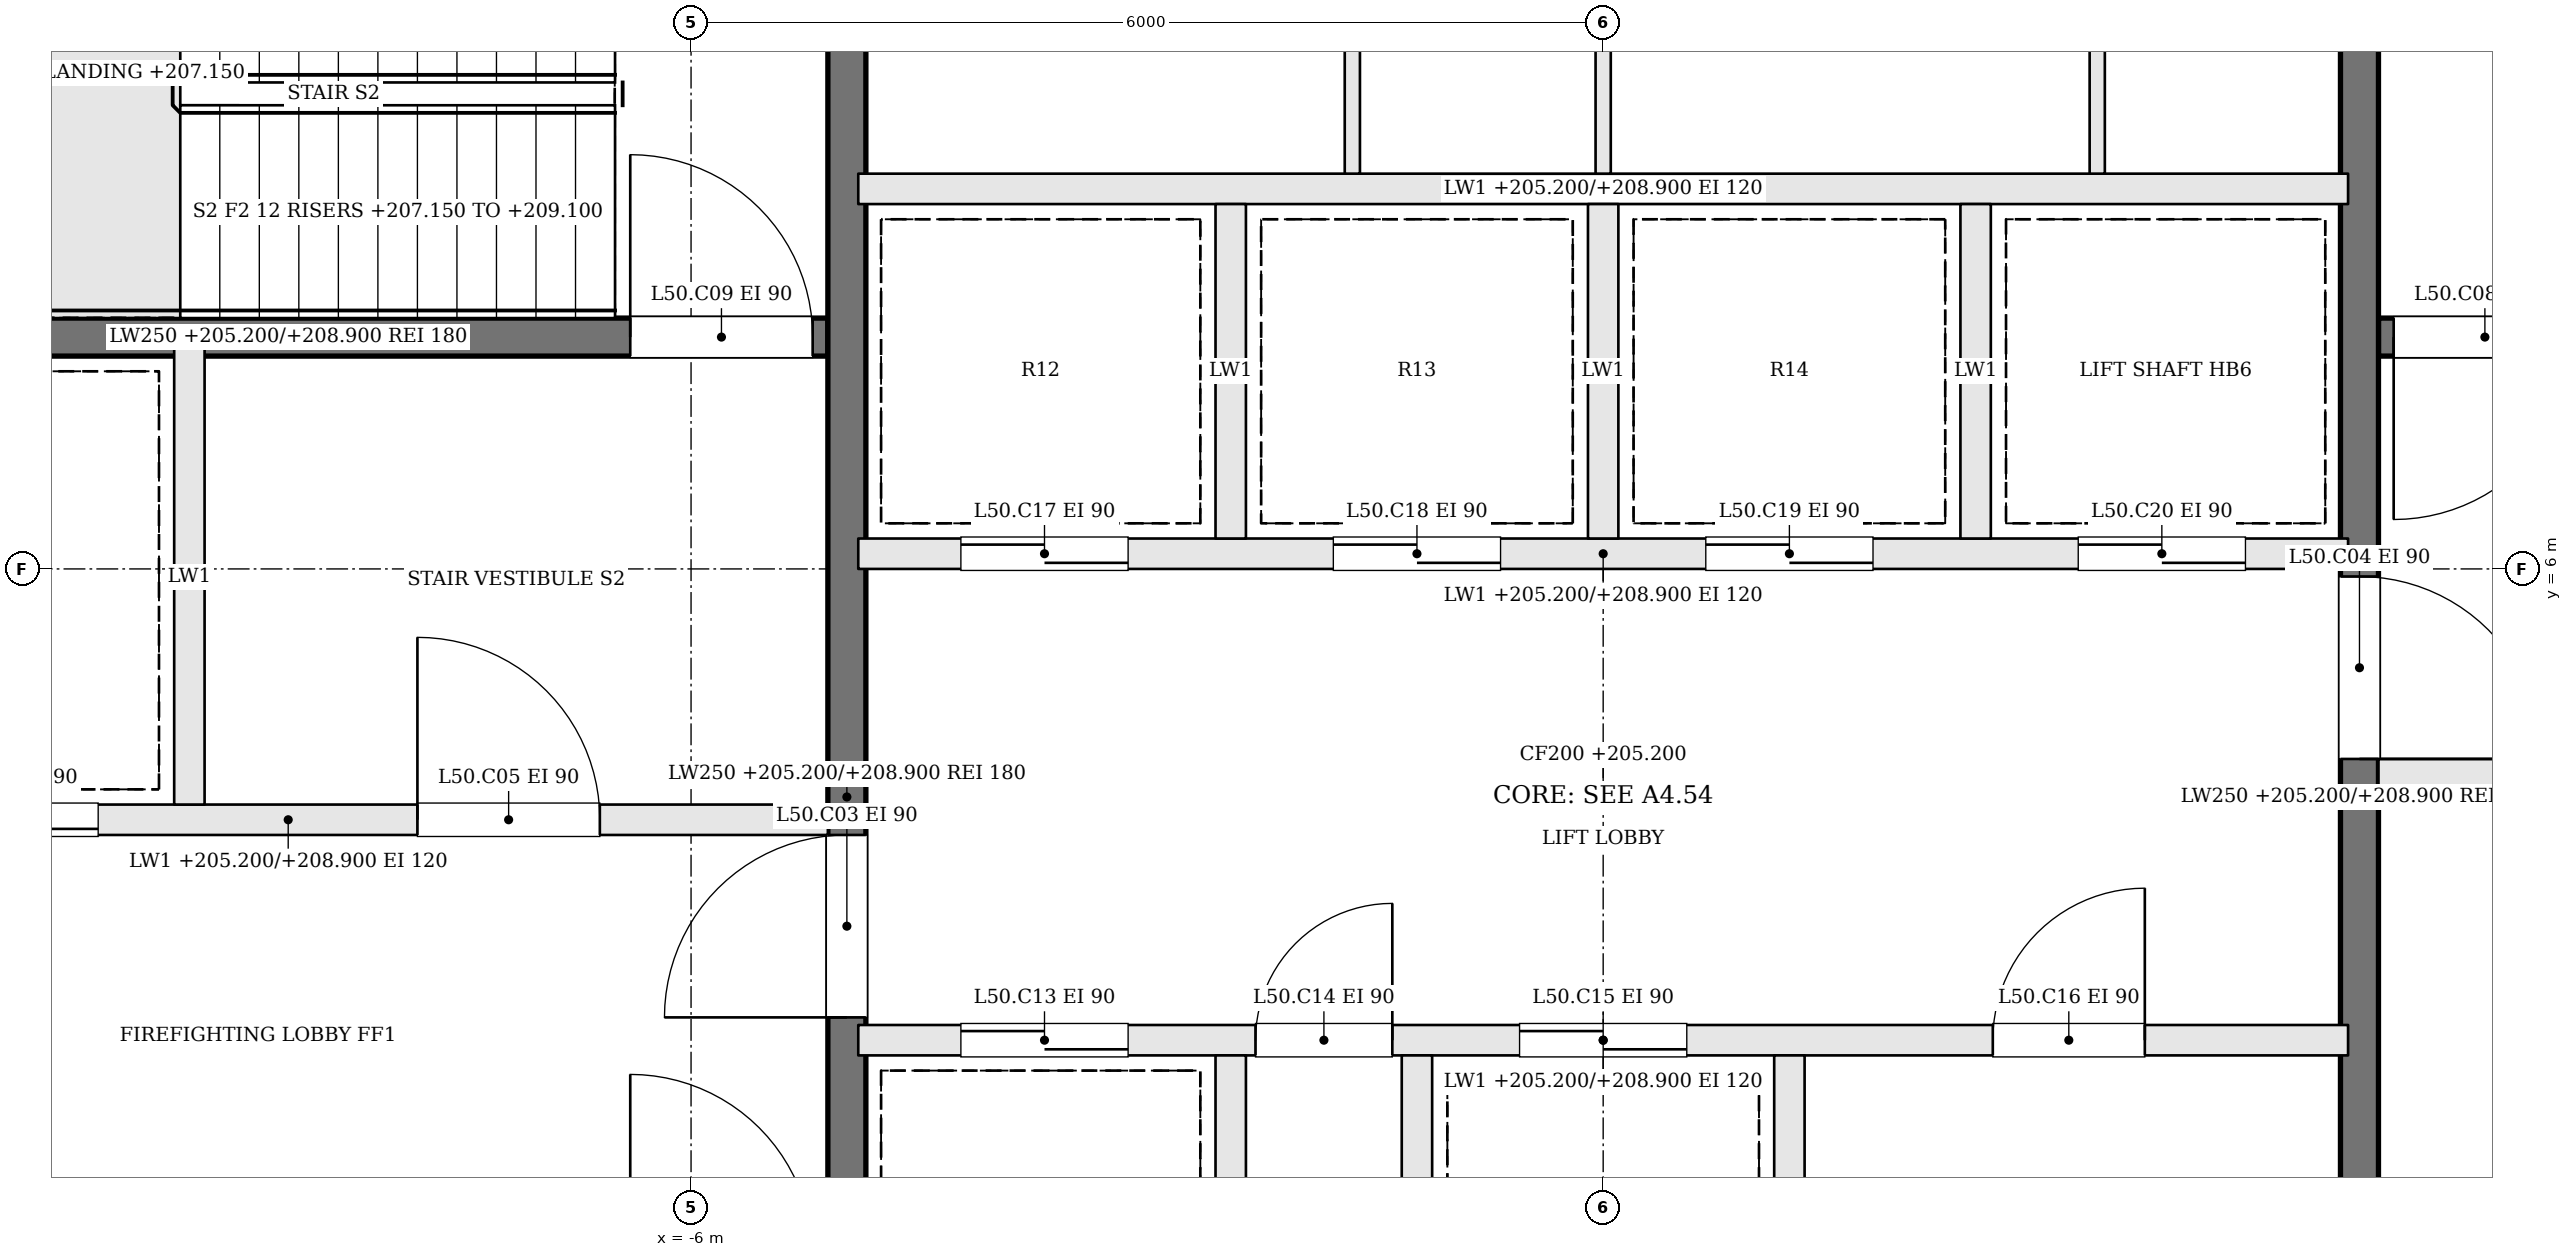
"""IFC4 building model, lengths in metres.
Left out: names, types, materials, properties, quantities, classifications, styles, units other than length and angle.
Written with IfcOpenShell. Run it as: python <this file> out.ifc"""

import sys

from ifc_helpers import new_model, si_unit, direction, frame, frame_2d, origin, place, context, subcontext, project, spatial, rectangle, extrude, element, fill, save


model = new_model("IFC4")
c1 = context("Model", 3, precision=1e-05, world=origin(), true_north=direction((0.0, 1.0)))
c2 = subcontext(c1, "Body", "Model", "MODEL_VIEW")
j1 = project(units=[si_unit("LENGTHUNIT", "METRE"), si_unit("PLANEANGLEUNIT", "RADIAN")], contexts=[c1])
p1 = place(None, origin())
s1 = spatial("IfcSite", under=j1, at=p1, CompositionType="ELEMENT")
p2 = place(p1, origin())
s2 = spatial("IfcBuilding", under=s1, at=p2, CompositionType="ELEMENT")
p3 = place(p2, frame((0.0, 0.0, 205.2)))
s3 = spatial("IfcBuildingStorey", under=s2, at=p3, CompositionType="ELEMENT", Elevation=205.2)
p4 = place(p3, frame((12.2, 7.525, 0.0), z_axis=(0.0, 0.0, 1.0), x_axis=(-1.0, 0.0, 0.0)))
e1 = element("IfcWall", 1, at=p4, inside=s3, PredefinedType="SOLIDWALL", context=c2, shape_type="SweptSolid", body=[
    extrude(rectangle(XDim=7.1, YDim=0.25, at=frame_2d((3.55, 0.0))), origin(), (0.0, 0.0, 1.0), 3.7),
])
p5 = place(p4, frame((5.8, 0.0, 0.0)))
e2 = element("IfcOpeningElement", 2, at=p5, cuts=e1, PredefinedType="OPENING", context=c2, shape_type="SweptSolid", body=[
    extrude(rectangle(XDim=1.2, YDim=2.1, at=frame_2d((0.6, 1.05))), frame((0.0, 0.135, 0.0), z_axis=(0.0, -1.0, 0.0), x_axis=(1.0, 0.0, 0.0)), (0.0, 0.0, 1.0), 0.27),
])
p6 = place(p3, frame((-12.2, 4.35, 0.0), z_axis=(0.0, 0.0, 1.0), x_axis=(1.0, 0.0, 0.0)))
e3 = element("IfcWall", 3, at=p6, inside=s3, PredefinedType="SOLIDWALL", context=c2, shape_type="SweptSolid", body=[
    extrude(rectangle(XDim=7.1, YDim=0.2, at=frame_2d((3.55, 0.0))), origin(), (0.0, 0.0, 1.0), 3.7),
])
p7 = place(p6, frame((4.4, 0.0, 0.0)))
e4 = element("IfcOpeningElement", 4, at=p7, cuts=e3, PredefinedType="OPENING", context=c2, shape_type="SweptSolid", body=[
    extrude(rectangle(XDim=1.2, YDim=2.1, at=frame_2d((0.6, 1.05))), frame((0.0, 0.11, 0.0), z_axis=(0.0, -1.0, 0.0), x_axis=(1.0, 0.0, 0.0)), (0.0, 0.0, 1.0), 0.22),
])
p8 = place(p6, frame((1.1, 0.0, 0.0)))
e5 = element("IfcOpeningElement", 5, at=p8, cuts=e3, PredefinedType="OPENING", context=c2, shape_type="SweptSolid", body=[
    extrude(rectangle(XDim=1.2, YDim=2.1, at=frame_2d((0.6, 1.05))), frame((0.0, 0.11, 0.0), z_axis=(0.0, -1.0, 0.0), x_axis=(1.0, 0.0, 0.0)), (0.0, 0.0, 1.0), 0.22),
])
p9 = place(p3, frame((12.2, 4.65, 0.0), z_axis=(0.0, 0.0, 1.0), x_axis=(-1.0, 0.0, 0.0)))
e6 = element("IfcWall", 6, at=p9, inside=s3, PredefinedType="SOLIDWALL", context=c2, shape_type="SweptSolid", body=[
    extrude(rectangle(XDim=7.1, YDim=0.2, at=frame_2d((3.55, 0.0))), origin(), (0.0, 0.0, 1.0), 3.7),
])
p10 = place(p9, frame((4.4, 0.0, 0.0)))
e7 = element("IfcOpeningElement", 7, at=p10, cuts=e6, PredefinedType="OPENING", context=c2, shape_type="SweptSolid", body=[
    extrude(rectangle(XDim=1.2, YDim=2.1, at=frame_2d((0.6, 1.05))), frame((0.0, 0.11, 0.0), z_axis=(0.0, -1.0, 0.0), x_axis=(1.0, 0.0, 0.0)), (0.0, 0.0, 1.0), 0.22),
])
p11 = place(p9, frame((1.1, 0.0, 0.0)))
e8 = element("IfcOpeningElement", 8, at=p11, cuts=e6, PredefinedType="OPENING", context=c2, shape_type="SweptSolid", body=[
    extrude(rectangle(XDim=1.2, YDim=2.1, at=frame_2d((0.6, 1.05))), frame((0.0, 0.11, 0.0), z_axis=(0.0, -1.0, 0.0), x_axis=(1.0, 0.0, 0.0)), (0.0, 0.0, 1.0), 0.22),
])
p12 = place(p3, frame((-12.2, 7.525, 0.0), z_axis=(0.0, 0.0, 1.0), x_axis=(1.0, 0.0, 0.0)))
e9 = element("IfcWall", 9, at=p12, inside=s3, PredefinedType="SOLIDWALL", context=c2, shape_type="SweptSolid", body=[
    extrude(rectangle(XDim=7.1, YDim=0.25, at=frame_2d((3.55, 0.0))), origin(), (0.0, 0.0, 1.0), 3.7),
])
p13 = place(p12, frame((5.8, 0.0, 0.0)))
e10 = element("IfcOpeningElement", 10, at=p13, cuts=e9, PredefinedType="OPENING", context=c2, shape_type="SweptSolid", body=[
    extrude(rectangle(XDim=1.2, YDim=2.1, at=frame_2d((0.6, 1.05))), frame((0.0, 0.135, 0.0), z_axis=(0.0, -1.0, 0.0), x_axis=(1.0, 0.0, 0.0)), (0.0, 0.0, 1.0), 0.27),
])
p14 = place(p3, frame((-9.3, 4.45, 0.0), z_axis=(0.0, 0.0, 1.0), x_axis=(0.0, 1.0, 0.0)))
e11 = element("IfcWall", 11, at=p14, inside=s3, PredefinedType="SOLIDWALL", context=c2, shape_type="SweptSolid", body=[
    extrude(rectangle(XDim=3.0, YDim=0.2, at=frame_2d((1.5, 0.0))), origin(), (0.0, 0.0, 1.0), 3.7),
])
p15 = place(p3, frame((-4.975, -2.2, 0.0), z_axis=(0.0, 0.0, 1.0), x_axis=(0.0, 1.0, 0.0)))
e12 = element("IfcWall", 12, at=p15, inside=s3, PredefinedType="SOLIDWALL", context=c2, shape_type="SweptSolid", body=[
    extrude(rectangle(XDim=13.4, YDim=0.25, at=frame_2d((6.7, 0.0))), origin(), (0.0, 0.0, 1.0), 3.7),
])
p16 = place(p15, frame((5.25, 0.0, 0.0)))
e13 = element("IfcOpeningElement", 13, at=p16, cuts=e12, PredefinedType="OPENING", context=c2, shape_type="SweptSolid", body=[
    extrude(rectangle(XDim=1.2, YDim=2.1, at=frame_2d((0.6, 1.05))), frame((0.0, 0.135, 0.0), z_axis=(0.0, -1.0, 0.0), x_axis=(1.0, 0.0, 0.0)), (0.0, 0.0, 1.0), 0.27),
])
p17 = place(p3, frame((4.975, 11.2, 0.0), z_axis=(0.0, 0.0, 1.0), x_axis=(0.0, -1.0, 0.0)))
e14 = element("IfcWall", 14, at=p17, inside=s3, PredefinedType="SOLIDWALL", context=c2, shape_type="SweptSolid", body=[
    extrude(rectangle(XDim=13.4, YDim=0.25, at=frame_2d((6.7, 0.0))), origin(), (0.0, 0.0, 1.0), 3.7),
])
p18 = place(p17, frame((5.25, 0.0, 0.0)))
e15 = element("IfcOpeningElement", 15, at=p18, cuts=e14, PredefinedType="OPENING", context=c2, shape_type="SweptSolid", body=[
    extrude(rectangle(XDim=1.2, YDim=2.1, at=frame_2d((0.6, 1.05))), frame((0.0, 0.135, 0.0), z_axis=(0.0, -1.0, 0.0), x_axis=(1.0, 0.0, 0.0)), (0.0, 0.0, 1.0), 0.27),
])
p19 = place(p3, frame((-4.9, 2.9, 0.0), z_axis=(0.0, 0.0, 1.0), x_axis=(1.0, 0.0, 0.0)))
e16 = element("IfcWall", 16, at=p19, inside=s3, PredefinedType="SOLIDWALL", context=c2, shape_type="SweptSolid", body=[
    extrude(rectangle(XDim=9.8, YDim=0.2, at=frame_2d((4.9, 0.0))), origin(), (0.0, 0.0, 1.0), 3.7),
])
p20 = place(p19, frame((0.675, 0.0, 0.0)))
e17 = element("IfcOpeningElement", 17, at=p20, cuts=e16, PredefinedType="OPENING", context=c2, shape_type="SweptSolid", body=[
    extrude(rectangle(XDim=1.1, YDim=2.1, at=frame_2d((0.55, 1.05))), frame((0.0, 0.11, 0.0), z_axis=(0.0, -1.0, 0.0), x_axis=(1.0, 0.0, 0.0)), (0.0, 0.0, 1.0), 0.22),
])
p21 = place(p19, frame((2.613, 0.0, 0.0)))
e18 = element("IfcOpeningElement", 18, at=p21, cuts=e16, PredefinedType="OPENING", context=c2, shape_type="SweptSolid", body=[
    extrude(rectangle(XDim=0.9, YDim=2.1, at=frame_2d((0.45, 1.05))), frame((0.0, 0.11, 0.0), z_axis=(0.0, -1.0, 0.0), x_axis=(1.0, 0.0, 0.0)), (0.0, 0.0, 1.0), 0.22),
])
p22 = place(p19, frame((4.35, 0.0, 0.0)))
e19 = element("IfcOpeningElement", 19, at=p22, cuts=e16, PredefinedType="OPENING", context=c2, shape_type="SweptSolid", body=[
    extrude(rectangle(XDim=1.1, YDim=2.1, at=frame_2d((0.55, 1.05))), frame((0.0, 0.11, 0.0), z_axis=(0.0, -1.0, 0.0), x_axis=(1.0, 0.0, 0.0)), (0.0, 0.0, 1.0), 0.22),
])
p23 = place(p19, frame((7.463, 0.0, 0.0)))
e20 = element("IfcOpeningElement", 20, at=p23, cuts=e16, PredefinedType="OPENING", context=c2, shape_type="SweptSolid", body=[
    extrude(rectangle(XDim=1.0, YDim=2.1, at=frame_2d((0.5, 1.05))), frame((0.0, 0.11, 0.0), z_axis=(0.0, -1.0, 0.0), x_axis=(1.0, 0.0, 0.0)), (0.0, 0.0, 1.0), 0.22),
])
p24 = place(p3, frame((-4.9, 6.1, 0.0), z_axis=(0.0, 0.0, 1.0), x_axis=(1.0, 0.0, 0.0)))
e21 = element("IfcWall", 21, at=p24, inside=s3, PredefinedType="SOLIDWALL", context=c2, shape_type="SweptSolid", body=[
    extrude(rectangle(XDim=9.8, YDim=0.2, at=frame_2d((4.9, 0.0))), origin(), (0.0, 0.0, 1.0), 3.7),
])
p25 = place(p24, frame((0.675, 0.0, 0.0)))
e22 = element("IfcOpeningElement", 22, at=p25, cuts=e21, PredefinedType="OPENING", context=c2, shape_type="SweptSolid", body=[
    extrude(rectangle(XDim=1.1, YDim=2.1, at=frame_2d((0.55, 1.05))), frame((0.0, 0.11, 0.0), z_axis=(0.0, -1.0, 0.0), x_axis=(1.0, 0.0, 0.0)), (0.0, 0.0, 1.0), 0.22),
])
p26 = place(p24, frame((3.125, 0.0, 0.0)))
e23 = element("IfcOpeningElement", 23, at=p26, cuts=e21, PredefinedType="OPENING", context=c2, shape_type="SweptSolid", body=[
    extrude(rectangle(XDim=1.1, YDim=2.1, at=frame_2d((0.55, 1.05))), frame((0.0, 0.11, 0.0), z_axis=(0.0, -1.0, 0.0), x_axis=(1.0, 0.0, 0.0)), (0.0, 0.0, 1.0), 0.22),
])
p27 = place(p24, frame((5.575, 0.0, 0.0)))
e24 = element("IfcOpeningElement", 24, at=p27, cuts=e21, PredefinedType="OPENING", context=c2, shape_type="SweptSolid", body=[
    extrude(rectangle(XDim=1.1, YDim=2.1, at=frame_2d((0.55, 1.05))), frame((0.0, 0.11, 0.0), z_axis=(0.0, -1.0, 0.0), x_axis=(1.0, 0.0, 0.0)), (0.0, 0.0, 1.0), 0.22),
])
p28 = place(p24, frame((8.025, 0.0, 0.0)))
e25 = element("IfcOpeningElement", 25, at=p28, cuts=e21, PredefinedType="OPENING", context=c2, shape_type="SweptSolid", body=[
    extrude(rectangle(XDim=1.1, YDim=2.1, at=frame_2d((0.55, 1.05))), frame((0.0, 0.11, 0.0), z_axis=(0.0, -1.0, 0.0), x_axis=(1.0, 0.0, 0.0)), (0.0, 0.0, 1.0), 0.22),
])
p29 = place(p3, frame((-4.9, 8.5, 0.0), z_axis=(0.0, 0.0, 1.0), x_axis=(1.0, 0.0, 0.0)))
e26 = element("IfcWall", 26, at=p29, inside=s3, PredefinedType="SOLIDWALL", context=c2, shape_type="SweptSolid", body=[
    extrude(rectangle(XDim=9.8, YDim=0.2, at=frame_2d((4.9, 0.0))), origin(), (0.0, 0.0, 1.0), 3.7),
])
for number, where, z_axis, x_axis in (
    (27, (-2.45, 0.6, 0.0), (0.0, 0.0, 1.0), (0.0, 1.0, 0.0)),
    (28, (-1.225, 0.6, 0.0), (0.0, 0.0, 1.0), (0.0, 1.0, 0.0)),
    (29, (1.225, 0.6, 0.0), (0.0, 0.0, 1.0), (0.0, 1.0, 0.0)),
    (30, (-2.45, 6.2, 0.0), (0.0, 0.0, 1.0), (0.0, 1.0, 0.0)),
    (31, (0.0, 6.2, 0.0), (0.0, 0.0, 1.0), (0.0, 1.0, 0.0)),
    (32, (2.45, 6.2, 0.0), (0.0, 0.0, 1.0), (0.0, 1.0, 0.0)),
):
    element("IfcWall", number, at=place(p3, frame(where, z_axis=z_axis, x_axis=x_axis)), inside=s3, PredefinedType="SOLIDWALL", context=c2, shape_type="SweptSolid", body=[
        extrude(rectangle(XDim=2.2, YDim=0.2, at=frame_2d((1.1, 0.0))), origin(), (0.0, 0.0, 1.0), 3.7),
    ])
for number, where, z_axis, x_axis in (
    (33, (-1.65, 8.6, 0.0), (0.0, 0.0, 1.0), (0.0, 1.0, 0.0)),
    (34, (0.0, 8.6, 0.0), (0.0, 0.0, 1.0), (0.0, 1.0, 0.0)),
    (35, (3.25, 8.6, 0.0), (0.0, 0.0, 1.0), (0.0, 1.0, 0.0)),
):
    element("IfcWall", number, at=place(p3, frame(where, z_axis=z_axis, x_axis=x_axis)), inside=s3, PredefinedType="PARTITIONING", context=c2, shape_type="SweptSolid", body=[
        extrude(rectangle(XDim=2.6, YDim=0.1, at=frame_2d((1.3, 0.0))), origin(), (0.0, 0.0, 1.0), 3.7),
    ])
p30 = place(p16, origin())
e36 = element("IfcDoor", 36, at=p30, inside=s3, OperationType="SINGLE_SWING_LEFT", PredefinedType="DOOR", context=c2, shape_type="SweptSolid", body=[
    extrude(rectangle(XDim=1.2, YDim=2.1, at=frame_2d((0.6, 1.05))), frame((0.0, 0.025, 0.0), z_axis=(0.0, -1.0, 0.0), x_axis=(1.0, 0.0, 0.0)), (0.0, 0.0, 1.0), 0.05),
])
fill(e13, e36)
p31 = place(p18, origin())
e37 = element("IfcDoor", 37, at=p31, inside=s3, OperationType="SINGLE_SWING_RIGHT", PredefinedType="DOOR", context=c2, shape_type="SweptSolid", body=[
    extrude(rectangle(XDim=1.2, YDim=2.1, at=frame_2d((0.6, 1.05))), frame((0.0, 0.025, 0.0), z_axis=(0.0, -1.0, 0.0), x_axis=(1.0, 0.0, 0.0)), (0.0, 0.0, 1.0), 0.05),
])
fill(e15, e37)
p32 = place(p7, origin())
e38 = element("IfcDoor", 38, at=p32, inside=s3, OperationType="SINGLE_SWING_LEFT", PredefinedType="DOOR", context=c2, shape_type="SweptSolid", body=[
    extrude(rectangle(XDim=1.2, YDim=2.1, at=frame_2d((0.6, 1.05))), frame((0.0, 0.025, 0.0), z_axis=(0.0, -1.0, 0.0), x_axis=(1.0, 0.0, 0.0)), (0.0, 0.0, 1.0), 0.05),
])
fill(e4, e38)
p33 = place(p5, origin())
e39 = element("IfcDoor", 39, at=p33, inside=s3, OperationType="SINGLE_SWING_RIGHT", PredefinedType="DOOR", context=c2, shape_type="SweptSolid", body=[
    extrude(rectangle(XDim=1.2, YDim=2.1, at=frame_2d((0.6, 1.05))), frame((0.0, 0.025, 0.0), z_axis=(0.0, -1.0, 0.0), x_axis=(1.0, 0.0, 0.0)), (0.0, 0.0, 1.0), 0.05),
])
fill(e2, e39)
p34 = place(p13, origin())
e40 = element("IfcDoor", 40, at=p34, inside=s3, OperationType="SINGLE_SWING_LEFT", PredefinedType="DOOR", context=c2, shape_type="SweptSolid", body=[
    extrude(rectangle(XDim=1.2, YDim=2.1, at=frame_2d((0.6, 1.05))), frame((0.0, 0.025, 0.0), z_axis=(0.0, -1.0, 0.0), x_axis=(1.0, 0.0, 0.0)), (0.0, 0.0, 1.0), 0.05),
])
fill(e10, e40)
p35 = place(p8, origin())
e41 = element("IfcDoor", 41, at=p35, inside=s3, OperationType="SLIDING_TO_RIGHT", PredefinedType="DOOR", context=c2, shape_type="SweptSolid", body=[
    extrude(rectangle(XDim=1.2, YDim=2.1, at=frame_2d((0.6, 1.05))), frame((0.0, 0.025, 0.0), z_axis=(0.0, -1.0, 0.0), x_axis=(1.0, 0.0, 0.0)), (0.0, 0.0, 1.0), 0.05),
])
fill(e5, e41)
p36 = place(p20, origin())
e42 = element("IfcDoor", 42, at=p36, inside=s3, OperationType="SLIDING_TO_RIGHT", PredefinedType="DOOR", context=c2, shape_type="SweptSolid", body=[
    extrude(rectangle(XDim=1.1, YDim=2.1, at=frame_2d((0.55, 1.05))), frame((0.0, 0.025, 0.0), z_axis=(0.0, -1.0, 0.0), x_axis=(1.0, 0.0, 0.0)), (0.0, 0.0, 1.0), 0.05),
])
fill(e17, e42)
p37 = place(p21, origin())
e43 = element("IfcDoor", 43, at=p37, inside=s3, OperationType="SINGLE_SWING_RIGHT", PredefinedType="DOOR", context=c2, shape_type="SweptSolid", body=[
    extrude(rectangle(XDim=0.9, YDim=2.1, at=frame_2d((0.45, 1.05))), frame((0.0, 0.025, 0.0), z_axis=(0.0, -1.0, 0.0), x_axis=(1.0, 0.0, 0.0)), (0.0, 0.0, 1.0), 0.05),
])
fill(e18, e43)
p38 = place(p22, origin())
e44 = element("IfcDoor", 44, at=p38, inside=s3, OperationType="SLIDING_TO_LEFT", PredefinedType="DOOR", context=c2, shape_type="SweptSolid", body=[
    extrude(rectangle(XDim=1.1, YDim=2.1, at=frame_2d((0.55, 1.05))), frame((0.0, 0.025, 0.0), z_axis=(0.0, -1.0, 0.0), x_axis=(1.0, 0.0, 0.0)), (0.0, 0.0, 1.0), 0.05),
])
fill(e19, e44)
p39 = place(p23, origin())
e45 = element("IfcDoor", 45, at=p39, inside=s3, OperationType="SINGLE_SWING_RIGHT", PredefinedType="DOOR", context=c2, shape_type="SweptSolid", body=[
    extrude(rectangle(XDim=1.0, YDim=2.1, at=frame_2d((0.5, 1.05))), frame((0.0, 0.025, 0.0), z_axis=(0.0, -1.0, 0.0), x_axis=(1.0, 0.0, 0.0)), (0.0, 0.0, 1.0), 0.05),
])
fill(e20, e45)
p40 = place(p25, origin())
e46 = element("IfcDoor", 46, at=p40, inside=s3, OperationType="SLIDING_TO_RIGHT", PredefinedType="DOOR", context=c2, shape_type="SweptSolid", body=[
    extrude(rectangle(XDim=1.1, YDim=2.1, at=frame_2d((0.55, 1.05))), frame((0.0, 0.025, 0.0), z_axis=(0.0, -1.0, 0.0), x_axis=(1.0, 0.0, 0.0)), (0.0, 0.0, 1.0), 0.05),
])
fill(e22, e46)
p41 = place(p26, origin())
e47 = element("IfcDoor", 47, at=p41, inside=s3, OperationType="SLIDING_TO_LEFT", PredefinedType="DOOR", context=c2, shape_type="SweptSolid", body=[
    extrude(rectangle(XDim=1.1, YDim=2.1, at=frame_2d((0.55, 1.05))), frame((0.0, 0.025, 0.0), z_axis=(0.0, -1.0, 0.0), x_axis=(1.0, 0.0, 0.0)), (0.0, 0.0, 1.0), 0.05),
])
fill(e23, e47)
p42 = place(p27, origin())
e48 = element("IfcDoor", 48, at=p42, inside=s3, OperationType="SLIDING_TO_RIGHT", PredefinedType="DOOR", context=c2, shape_type="SweptSolid", body=[
    extrude(rectangle(XDim=1.1, YDim=2.1, at=frame_2d((0.55, 1.05))), frame((0.0, 0.025, 0.0), z_axis=(0.0, -1.0, 0.0), x_axis=(1.0, 0.0, 0.0)), (0.0, 0.0, 1.0), 0.05),
])
fill(e24, e48)
p43 = place(p28, origin())
e49 = element("IfcDoor", 49, at=p43, inside=s3, OperationType="SLIDING_TO_LEFT", PredefinedType="DOOR", context=c2, shape_type="SweptSolid", body=[
    extrude(rectangle(XDim=1.1, YDim=2.1, at=frame_2d((0.55, 1.05))), frame((0.0, 0.025, 0.0), z_axis=(0.0, -1.0, 0.0), x_axis=(1.0, 0.0, 0.0)), (0.0, 0.0, 1.0), 0.05),
])
fill(e25, e49)
save(model, sys.argv[1])
